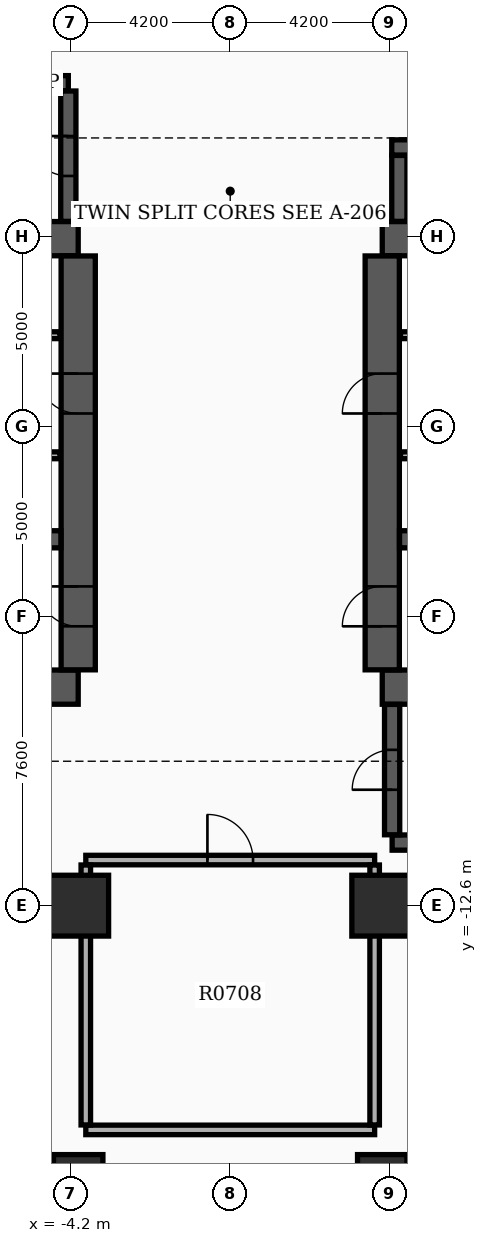
"""IFC4 building model, lengths in metres.
Left out: names, types, materials, properties, quantities, classifications, styles, units other than length and angle.
Written with IfcOpenShell. Run it as: python <this file> out.ifc"""

import sys

from ifc_helpers import new_model, si_unit, direction, frame, frame_2d, origin, origin_2d, place, context, subcontext, project, spatial, rectangle, extrude, element, fill, save


model = new_model("IFC4")
c1 = context("Model", 3, precision=1e-05, world=origin(), true_north=direction((0.0, 1.0)))
c2 = subcontext(c1, "Body", "Model", "MODEL_VIEW")
j1 = project(units=[si_unit("LENGTHUNIT", "METRE"), si_unit("PLANEANGLEUNIT", "RADIAN")], contexts=[c1])
p1 = place(None, origin())
s1 = spatial("IfcSite", under=j1, at=p1, CompositionType="ELEMENT")
p2 = place(p1, origin())
s2 = spatial("IfcBuilding", under=s1, at=p2, CompositionType="ELEMENT")
p3 = place(p2, frame((0.0, 0.0, 47.1)))
s3 = spatial("IfcBuildingStorey", under=s2, at=p3, CompositionType="ELEMENT", Elevation=47.1)
for number, where, z_axis, x_axis in (
    (1, (-12.4, -6.85, 0.0), (0.0, 0.0, 1.0), (1.0, 0.0, 0.0)),
    (2, (-12.4, 4.95, 0.0), (0.0, 0.0, 1.0), (1.0, 0.0, 0.0)),
):
    element("IfcWall", number, at=place(p3, frame(where, z_axis=z_axis, x_axis=x_axis)), inside=s3, PredefinedType="SHEAR", context=c2, shape_type="SweptSolid", body=[
        extrude(rectangle(XDim=8.4, YDim=0.9, at=frame_2d((4.2, 0.0))), origin(), (0.0, 0.0, 1.0), 4.9),
    ])
p4 = place(p3, frame((-4.0, -6.395, 0.0), z_axis=(0.0, 0.0, 1.0), x_axis=(0.0, 1.0, 0.0)))
e3 = element("IfcWall", 3, at=p4, inside=s3, PredefinedType="SHEAR", context=c2, shape_type="SweptSolid", body=[
    extrude(rectangle(XDim=10.89, YDim=0.9, at=frame_2d((5.445, 0.0))), origin(), (0.0, 0.0, 1.0), 4.9),
])
p5 = place(p4, frame((1.145, 0.0, 0.0)))
e4 = element("IfcOpeningElement", 4, at=p5, cuts=e3, PredefinedType="OPENING", context=c2, shape_type="SweptSolid", body=[
    extrude(rectangle(XDim=1.05, YDim=2.15, at=frame_2d((0.525, 1.075))), frame((0.0, 0.46, 0.0), z_axis=(0.0, -1.0, 0.0), x_axis=(1.0, 0.0, 0.0)), (0.0, 0.0, 1.0), 0.92),
])
p6 = place(p4, frame((6.745, 0.0, 0.0)))
e5 = element("IfcOpeningElement", 5, at=p6, cuts=e3, PredefinedType="OPENING", context=c2, shape_type="SweptSolid", body=[
    extrude(rectangle(XDim=1.05, YDim=2.15, at=frame_2d((0.525, 1.075))), frame((0.0, 0.46, 0.0), z_axis=(0.0, -1.0, 0.0), x_axis=(1.0, 0.0, 0.0)), (0.0, 0.0, 1.0), 0.92),
])
p7 = place(p3, frame((-11.945, -2.96, 0.0), z_axis=(0.0, 0.0, 1.0), x_axis=(1.0, 0.0, 0.0)))
e6 = element("IfcWall", 6, at=p7, inside=s3, PredefinedType="SHEAR", context=c2, shape_type="SweptSolid", body=[
    extrude(rectangle(XDim=7.49, YDim=0.45, at=frame_2d((3.745, 0.0))), origin(), (0.0, 0.0, 1.0), 4.9),
])
for number, where, z_axis, x_axis in (
    (7, (4.0, -6.85, 0.0), (0.0, 0.0, 1.0), (1.0, 0.0, 0.0)),
    (8, (4.0, 4.95, 0.0), (0.0, 0.0, 1.0), (1.0, 0.0, 0.0)),
):
    element("IfcWall", number, at=place(p3, frame(where, z_axis=z_axis, x_axis=x_axis)), inside=s3, PredefinedType="SHEAR", context=c2, shape_type="SweptSolid", body=[
        extrude(rectangle(XDim=8.4, YDim=0.9, at=frame_2d((4.2, 0.0))), origin(), (0.0, 0.0, 1.0), 4.9),
    ])
p8 = place(p3, frame((4.0, -6.395, 0.0), z_axis=(0.0, 0.0, 1.0), x_axis=(0.0, 1.0, 0.0)))
e9 = element("IfcWall", 9, at=p8, inside=s3, PredefinedType="SHEAR", context=c2, shape_type="SweptSolid", body=[
    extrude(rectangle(XDim=10.89, YDim=0.9, at=frame_2d((5.445, 0.0))), origin(), (0.0, 0.0, 1.0), 4.9),
])
p9 = place(p8, frame((1.145, 0.0, 0.0)))
e10 = element("IfcOpeningElement", 10, at=p9, cuts=e9, PredefinedType="OPENING", context=c2, shape_type="SweptSolid", body=[
    extrude(rectangle(XDim=1.05, YDim=2.15, at=frame_2d((0.525, 1.075))), frame((0.0, 0.46, 0.0), z_axis=(0.0, -1.0, 0.0), x_axis=(1.0, 0.0, 0.0)), (0.0, 0.0, 1.0), 0.92),
])
p10 = place(p8, frame((6.745, 0.0, 0.0)))
e11 = element("IfcOpeningElement", 11, at=p10, cuts=e9, PredefinedType="OPENING", context=c2, shape_type="SweptSolid", body=[
    extrude(rectangle(XDim=1.05, YDim=2.15, at=frame_2d((0.525, 1.075))), frame((0.0, 0.46, 0.0), z_axis=(0.0, -1.0, 0.0), x_axis=(1.0, 0.0, 0.0)), (0.0, 0.0, 1.0), 0.92),
])
p11 = place(p3, frame((4.455, -2.96, 0.0), z_axis=(0.0, 0.0, 1.0), x_axis=(1.0, 0.0, 0.0)))
e12 = element("IfcWall", 12, at=p11, inside=s3, PredefinedType="SHEAR", context=c2, shape_type="SweptSolid", body=[
    extrude(rectangle(XDim=7.49, YDim=0.45, at=frame_2d((3.745, 0.0))), origin(), (0.0, 0.0, 1.0), 4.9),
])
p12 = place(p3, frame((-12.22, 9.04, 0.0), z_axis=(0.0, 0.0, 1.0), x_axis=(1.0, 0.0, 0.0)))
e13 = element("IfcWall", 13, at=p12, inside=s3, PredefinedType="SHEAR", context=c2, shape_type="SweptSolid", body=[
    extrude(rectangle(XDim=7.96, YDim=0.4, at=frame_2d((3.98, 0.0))), origin(), (0.0, 0.0, 1.0), 4.9),
])
p13 = place(p3, frame((-4.26, 5.405, 0.0), z_axis=(0.0, 0.0, 1.0), x_axis=(0.0, 1.0, 0.0)))
e14 = element("IfcWall", 14, at=p13, inside=s3, PredefinedType="SHEAR", context=c2, shape_type="SweptSolid", body=[
    extrude(rectangle(XDim=3.43, YDim=0.4, at=frame_2d((1.715, 0.0))), origin(), (0.0, 0.0, 1.0), 4.9),
])
p14 = place(p13, frame((1.195, 0.0, 0.0)))
e15 = element("IfcOpeningElement", 15, at=p14, cuts=e14, PredefinedType="OPENING", context=c2, shape_type="SweptSolid", body=[
    extrude(rectangle(XDim=1.05, YDim=2.15, at=frame_2d((0.525, 1.075))), frame((0.0, 0.21, 0.0), z_axis=(0.0, -1.0, 0.0), x_axis=(1.0, 0.0, 0.0)), (0.0, 0.0, 1.0), 0.42),
])
p15 = place(p3, frame((4.26, -10.94, 0.0), z_axis=(0.0, 0.0, 1.0), x_axis=(1.0, 0.0, 0.0)))
e16 = element("IfcWall", 16, at=p15, inside=s3, PredefinedType="SHEAR", context=c2, shape_type="SweptSolid", body=[
    extrude(rectangle(XDim=7.96, YDim=0.4, at=frame_2d((3.98, 0.0))), origin(), (0.0, 0.0, 1.0), 4.9),
])
p16 = place(p3, frame((4.26, -10.735, 0.0), z_axis=(0.0, 0.0, 1.0), x_axis=(0.0, 1.0, 0.0)))
e17 = element("IfcWall", 17, at=p16, inside=s3, PredefinedType="SHEAR", context=c2, shape_type="SweptSolid", body=[
    extrude(rectangle(XDim=3.43, YDim=0.4, at=frame_2d((1.715, 0.0))), origin(), (0.0, 0.0, 1.0), 4.9),
])
p17 = place(p16, frame((1.185, 0.0, 0.0)))
e18 = element("IfcOpeningElement", 18, at=p17, cuts=e17, PredefinedType="OPENING", context=c2, shape_type="SweptSolid", body=[
    extrude(rectangle(XDim=1.05, YDim=2.15, at=frame_2d((0.525, 1.075))), frame((0.0, 0.21, 0.0), z_axis=(0.0, -1.0, 0.0), x_axis=(1.0, 0.0, 0.0)), (0.0, 0.0, 1.0), 0.42),
])
p18 = place(p3, frame((4.45, 5.405, 0.0), z_axis=(0.0, 0.0, 1.0), x_axis=(0.0, 1.0, 0.0)))
e19 = element("IfcWall", 19, at=p18, inside=s3, PredefinedType="SHEAR", context=c2, shape_type="SweptSolid", body=[
    extrude(rectangle(XDim=1.735, YDim=0.4, at=frame_2d((0.867, 0.0))), origin(), (0.0, 0.0, 1.0), 4.9),
])
p19 = place(p3, frame((4.25, 7.35, 0.0), z_axis=(0.0, 0.0, 1.0), x_axis=(1.0, 0.0, 0.0)))
e20 = element("IfcWall", 20, at=p19, inside=s3, PredefinedType="SHEAR", context=c2, shape_type="SweptSolid", body=[
    extrude(rectangle(XDim=5.4, YDim=0.4, at=frame_2d((2.7, 0.0))), origin(), (0.0, 0.0, 1.0), 4.9),
])
p20 = place(p19, frame((0.85, 0.0, 0.0)))
e21 = element("IfcOpeningElement", 21, at=p20, cuts=e20, PredefinedType="OPENING", context=c2, shape_type="SweptSolid", body=[
    extrude(rectangle(XDim=1.2, YDim=2.2, at=frame_2d((0.6, 1.1))), frame((0.0, 0.21, 0.0), z_axis=(0.0, -1.0, 0.0), x_axis=(1.0, 0.0, 0.0)), (0.0, 0.0, 1.0), 0.42),
])
p21 = place(p19, frame((3.25, 0.0, 0.0)))
e22 = element("IfcOpeningElement", 22, at=p21, cuts=e20, PredefinedType="OPENING", context=c2, shape_type="SweptSolid", body=[
    extrude(rectangle(XDim=1.2, YDim=2.2, at=frame_2d((0.6, 1.1))), frame((0.0, 0.21, 0.0), z_axis=(0.0, -1.0, 0.0), x_axis=(1.0, 0.0, 0.0)), (0.0, 0.0, 1.0), 0.42),
])
for number, where, z_axis, x_axis in (
    (23, (-4.0, -12.6, 0.0), (0.0, 0.0, 1.0), (1.0, 0.0, 0.0)),
    (24, (4.0, -12.6, 0.0), (0.0, 0.0, 1.0), (1.0, 0.0, 0.0)),
):
    element("IfcColumn", number, at=place(p3, frame(where, z_axis=z_axis, x_axis=x_axis)), inside=s3, PredefinedType="COLUMN", context=c2, shape_type="SweptSolid", body=[
        extrude(rectangle(XDim=1.6, YDim=1.6, at=origin_2d()), origin(), (0.0, 0.0, 1.0), 5.1),
    ])
for number, where, z_axis, x_axis in (
    (25, (-4.0, -19.8, 0.0), (0.0, 0.0, 1.0), (1.0, 0.0, 0.0)),
    (26, (4.0, -19.8, 0.0), (0.0, 0.0, 1.0), (1.0, 0.0, 0.0)),
):
    element("IfcColumn", number, at=place(p3, frame(where, z_axis=z_axis, x_axis=x_axis)), inside=s3, PredefinedType="COLUMN", context=c2, shape_type="SweptSolid", body=[
        extrude(rectangle(XDim=1.3, YDim=1.3, at=origin_2d()), origin(), (0.0, 0.0, 1.0), 5.1),
    ])
p22 = place(p3, frame((-5.769, -15.333, 0.0), z_axis=(0.0, 0.0, 1.0), x_axis=(0.062784355807, -0.998027116198, 0.0)))
e27 = element("IfcWall", 27, at=p22, inside=s3, PredefinedType="STANDARD", context=c2, shape_type="SweptSolid", body=[
    extrude(rectangle(XDim=20.1, YDim=0.28, at=frame_2d((10.05, 0.0))), origin(), (0.0, 0.0, 1.0), 3.98),
])
p23 = place(p22, frame((0.85, 0.0, 0.95)))
e28 = element("IfcOpeningElement", 28, at=p23, cuts=e27, PredefinedType="OPENING", context=c2, shape_type="SweptSolid", body=[
    extrude(rectangle(XDim=1.1, YDim=1.2, at=frame_2d((0.55, 0.6))), frame((0.0, 0.15, 0.0), z_axis=(0.0, -1.0, 0.0), x_axis=(1.0, 0.0, 0.0)), (0.0, 0.0, 1.0), 0.3),
])
p24 = place(p3, frame((-11.9, 2.41, 0.0), z_axis=(0.0, 0.0, 1.0), x_axis=(1.0, 0.0, 0.0)))
e29 = element("IfcWall", 29, at=p24, inside=s3, PredefinedType="SOLIDWALL", context=c2, shape_type="SweptSolid", body=[
    extrude(rectangle(XDim=7.42, YDim=0.18, at=frame_2d((3.71, 0.0))), origin(), (0.0, 0.0, 1.0), 3.97),
])
p25 = place(p24, frame((0.55, 0.0, 0.0)))
e30 = element("IfcOpeningElement", 30, at=p25, cuts=e29, PredefinedType="OPENING", context=c2, shape_type="SweptSolid", body=[
    extrude(rectangle(XDim=1.1, YDim=2.15, at=frame_2d((0.55, 1.075))), frame((0.0, 0.1, 0.0), z_axis=(0.0, -1.0, 0.0), x_axis=(1.0, 0.0, 0.0)), (0.0, 0.0, 1.0), 0.2),
])
p26 = place(p24, frame((3.85, 0.0, 0.0)))
e31 = element("IfcOpeningElement", 31, at=p26, cuts=e29, PredefinedType="OPENING", context=c2, shape_type="SweptSolid", body=[
    extrude(rectangle(XDim=1.1, YDim=2.15, at=frame_2d((0.55, 1.075))), frame((0.0, 0.1, 0.0), z_axis=(0.0, -1.0, 0.0), x_axis=(1.0, 0.0, 0.0)), (0.0, 0.0, 1.0), 0.2),
])
p27 = place(p24, frame((5.75, 0.0, 0.0)))
e32 = element("IfcOpeningElement", 32, at=p27, cuts=e29, PredefinedType="OPENING", context=c2, shape_type="SweptSolid", body=[
    extrude(rectangle(XDim=1.1, YDim=2.15, at=frame_2d((0.55, 1.075))), frame((0.0, 0.1, 0.0), z_axis=(0.0, -1.0, 0.0), x_axis=(1.0, 0.0, 0.0)), (0.0, 0.0, 1.0), 0.2),
])
p28 = place(p3, frame((4.48, 2.41, 0.0), z_axis=(0.0, 0.0, 1.0), x_axis=(1.0, 0.0, 0.0)))
e33 = element("IfcWall", 33, at=p28, inside=s3, PredefinedType="SOLIDWALL", context=c2, shape_type="SweptSolid", body=[
    extrude(rectangle(XDim=7.42, YDim=0.18, at=frame_2d((3.71, 0.0))), origin(), (0.0, 0.0, 1.0), 3.97),
])
p29 = place(p28, frame((5.67, 0.0, 0.0)))
e34 = element("IfcOpeningElement", 34, at=p29, cuts=e33, PredefinedType="OPENING", context=c2, shape_type="SweptSolid", body=[
    extrude(rectangle(XDim=1.1, YDim=2.15, at=frame_2d((0.55, 1.075))), frame((0.0, 0.1, 0.0), z_axis=(0.0, -1.0, 0.0), x_axis=(1.0, 0.0, 0.0)), (0.0, 0.0, 1.0), 0.2),
])
p30 = place(p28, frame((0.52, 0.0, 0.0)))
e35 = element("IfcOpeningElement", 35, at=p30, cuts=e33, PredefinedType="OPENING", context=c2, shape_type="SweptSolid", body=[
    extrude(rectangle(XDim=1.1, YDim=2.15, at=frame_2d((0.55, 1.075))), frame((0.0, 0.1, 0.0), z_axis=(0.0, -1.0, 0.0), x_axis=(1.0, 0.0, 0.0)), (0.0, 0.0, 1.0), 0.2),
])
p31 = place(p28, frame((2.42, 0.0, 0.0)))
e36 = element("IfcOpeningElement", 36, at=p31, cuts=e33, PredefinedType="OPENING", context=c2, shape_type="SweptSolid", body=[
    extrude(rectangle(XDim=1.1, YDim=2.15, at=frame_2d((0.55, 1.075))), frame((0.0, 0.1, 0.0), z_axis=(0.0, -1.0, 0.0), x_axis=(1.0, 0.0, 0.0)), (0.0, 0.0, 1.0), 0.2),
])
p32 = place(p3, frame((-11.9, -0.75, 0.0), z_axis=(0.0, 0.0, 1.0), x_axis=(1.0, 0.0, 0.0)))
e37 = element("IfcWall", 37, at=p32, inside=s3, PredefinedType="SOLIDWALL", context=c2, shape_type="SweptSolid", body=[
    extrude(rectangle(XDim=7.42, YDim=0.18, at=frame_2d((3.71, 0.0))), origin(), (0.0, 0.0, 1.0), 3.97),
])
p33 = place(p32, frame((0.45, 0.0, 0.0)))
e38 = element("IfcOpeningElement", 38, at=p33, cuts=e37, PredefinedType="OPENING", context=c2, shape_type="SweptSolid", body=[
    extrude(rectangle(XDim=1.1, YDim=2.15, at=frame_2d((0.55, 1.075))), frame((0.0, 0.1, 0.0), z_axis=(0.0, -1.0, 0.0), x_axis=(1.0, 0.0, 0.0)), (0.0, 0.0, 1.0), 0.2),
])
p34 = place(p32, frame((2.35, 0.0, 0.0)))
e39 = element("IfcOpeningElement", 39, at=p34, cuts=e37, PredefinedType="OPENING", context=c2, shape_type="SweptSolid", body=[
    extrude(rectangle(XDim=1.1, YDim=2.15, at=frame_2d((0.55, 1.075))), frame((0.0, 0.1, 0.0), z_axis=(0.0, -1.0, 0.0), x_axis=(1.0, 0.0, 0.0)), (0.0, 0.0, 1.0), 0.2),
])
p35 = place(p32, frame((5.75, 0.0, 0.0)))
e40 = element("IfcOpeningElement", 40, at=p35, cuts=e37, PredefinedType="OPENING", context=c2, shape_type="SweptSolid", body=[
    extrude(rectangle(XDim=1.1, YDim=2.15, at=frame_2d((0.55, 1.075))), frame((0.0, 0.1, 0.0), z_axis=(0.0, -1.0, 0.0), x_axis=(1.0, 0.0, 0.0)), (0.0, 0.0, 1.0), 0.2),
])
p36 = place(p3, frame((4.48, -0.75, 0.0), z_axis=(0.0, 0.0, 1.0), x_axis=(1.0, 0.0, 0.0)))
e41 = element("IfcWall", 41, at=p36, inside=s3, PredefinedType="SOLIDWALL", context=c2, shape_type="SweptSolid", body=[
    extrude(rectangle(XDim=7.42, YDim=0.18, at=frame_2d((3.71, 0.0))), origin(), (0.0, 0.0, 1.0), 3.97),
])
p37 = place(p36, frame((0.52, 0.0, 0.0)))
e42 = element("IfcOpeningElement", 42, at=p37, cuts=e41, PredefinedType="OPENING", context=c2, shape_type="SweptSolid", body=[
    extrude(rectangle(XDim=1.1, YDim=2.15, at=frame_2d((0.55, 1.075))), frame((0.0, 0.1, 0.0), z_axis=(0.0, -1.0, 0.0), x_axis=(1.0, 0.0, 0.0)), (0.0, 0.0, 1.0), 0.2),
])
p38 = place(p36, frame((3.92, 0.0, 0.0)))
e43 = element("IfcOpeningElement", 43, at=p38, cuts=e41, PredefinedType="OPENING", context=c2, shape_type="SweptSolid", body=[
    extrude(rectangle(XDim=1.1, YDim=2.15, at=frame_2d((0.55, 1.075))), frame((0.0, 0.1, 0.0), z_axis=(0.0, -1.0, 0.0), x_axis=(1.0, 0.0, 0.0)), (0.0, 0.0, 1.0), 0.2),
])
p39 = place(p36, frame((5.82, 0.0, 0.0)))
e44 = element("IfcOpeningElement", 44, at=p39, cuts=e41, PredefinedType="OPENING", context=c2, shape_type="SweptSolid", body=[
    extrude(rectangle(XDim=1.1, YDim=2.15, at=frame_2d((0.55, 1.075))), frame((0.0, 0.1, 0.0), z_axis=(0.0, -1.0, 0.0), x_axis=(1.0, 0.0, 0.0)), (0.0, 0.0, 1.0), 0.2),
])
p40 = place(p3, frame((-3.8, -18.5, 0.0), z_axis=(0.0, 0.0, 1.0), x_axis=(1.0, 0.0, 0.0)))
e45 = element("IfcWall", 45, at=p40, inside=s3, PredefinedType="SOLIDWALL", context=c2, shape_type="SweptSolid", body=[
    extrude(rectangle(XDim=7.6, YDim=0.25, at=frame_2d((3.8, 0.0))), origin(), (0.0, 0.0, 1.0), 3.97),
])
p41 = place(p3, frame((-3.8, -11.4, 0.0), z_axis=(0.0, 0.0, 1.0), x_axis=(1.0, 0.0, 0.0)))
e46 = element("IfcWall", 46, at=p41, inside=s3, PredefinedType="SOLIDWALL", context=c2, shape_type="SweptSolid", body=[
    extrude(rectangle(XDim=7.6, YDim=0.25, at=frame_2d((3.8, 0.0))), origin(), (0.0, 0.0, 1.0), 3.97),
])
p42 = place(p41, frame((3.2, 0.0, 0.0)))
e47 = element("IfcOpeningElement", 47, at=p42, cuts=e46, PredefinedType="OPENING", context=c2, shape_type="SweptSolid", body=[
    extrude(rectangle(XDim=1.2, YDim=2.15, at=frame_2d((0.6, 1.075))), frame((0.0, 0.135, 0.0), z_axis=(0.0, -1.0, 0.0), x_axis=(1.0, 0.0, 0.0)), (0.0, 0.0, 1.0), 0.27),
])
for number, where, z_axis, x_axis in (
    (48, (-3.8, -18.37, 0.0), (0.0, 0.0, 1.0), (0.0, 1.0, 0.0)),
    (49, (3.8, -18.37, 0.0), (0.0, 0.0, 1.0), (0.0, 1.0, 0.0)),
):
    element("IfcWall", number, at=place(p3, frame(where, z_axis=z_axis, x_axis=x_axis)), inside=s3, PredefinedType="SOLIDWALL", context=c2, shape_type="SweptSolid", body=[
        extrude(rectangle(XDim=6.84, YDim=0.25, at=frame_2d((3.42, 0.0))), origin(), (0.0, 0.0, 1.0), 3.97),
    ])
p43 = place(p5, origin())
e50 = element("IfcDoor", 50, at=p43, inside=s3, OperationType="SINGLE_SWING_RIGHT", PredefinedType="DOOR", context=c2, shape_type="SweptSolid", body=[
    extrude(rectangle(XDim=1.05, YDim=2.15, at=frame_2d((0.525, 1.075))), frame((0.0, 0.025, 0.0), z_axis=(0.0, -1.0, 0.0), x_axis=(1.0, 0.0, 0.0)), (0.0, 0.0, 1.0), 0.05),
])
fill(e4, e50)
p44 = place(p9, origin())
e51 = element("IfcDoor", 51, at=p44, inside=s3, OperationType="SINGLE_SWING_LEFT", PredefinedType="DOOR", context=c2, shape_type="SweptSolid", body=[
    extrude(rectangle(XDim=1.05, YDim=2.15, at=frame_2d((0.525, 1.075))), frame((0.0, 0.025, 0.0), z_axis=(0.0, -1.0, 0.0), x_axis=(1.0, 0.0, 0.0)), (0.0, 0.0, 1.0), 0.05),
])
fill(e10, e51)
p45 = place(p6, origin())
e52 = element("IfcDoor", 52, at=p45, inside=s3, OperationType="SINGLE_SWING_RIGHT", PredefinedType="DOOR", context=c2, shape_type="SweptSolid", body=[
    extrude(rectangle(XDim=1.05, YDim=2.15, at=frame_2d((0.525, 1.075))), frame((0.0, 0.025, 0.0), z_axis=(0.0, -1.0, 0.0), x_axis=(1.0, 0.0, 0.0)), (0.0, 0.0, 1.0), 0.05),
])
fill(e5, e52)
p46 = place(p10, origin())
e53 = element("IfcDoor", 53, at=p46, inside=s3, OperationType="SINGLE_SWING_LEFT", PredefinedType="DOOR", context=c2, shape_type="SweptSolid", body=[
    extrude(rectangle(XDim=1.05, YDim=2.15, at=frame_2d((0.525, 1.075))), frame((0.0, 0.025, 0.0), z_axis=(0.0, -1.0, 0.0), x_axis=(1.0, 0.0, 0.0)), (0.0, 0.0, 1.0), 0.05),
])
fill(e11, e53)
p47 = place(p14, origin())
e54 = element("IfcDoor", 54, at=p47, inside=s3, OperationType="SINGLE_SWING_RIGHT", PredefinedType="DOOR", context=c2, shape_type="SweptSolid", body=[
    extrude(rectangle(XDim=1.05, YDim=2.15, at=frame_2d((0.525, 1.075))), frame((0.0, 0.025, 0.0), z_axis=(0.0, -1.0, 0.0), x_axis=(1.0, 0.0, 0.0)), (0.0, 0.0, 1.0), 0.05),
])
fill(e15, e54)
p48 = place(p17, origin())
e55 = element("IfcDoor", 55, at=p48, inside=s3, OperationType="SINGLE_SWING_LEFT", PredefinedType="DOOR", context=c2, shape_type="SweptSolid", body=[
    extrude(rectangle(XDim=1.05, YDim=2.15, at=frame_2d((0.525, 1.075))), frame((0.0, 0.025, 0.0), z_axis=(0.0, -1.0, 0.0), x_axis=(1.0, 0.0, 0.0)), (0.0, 0.0, 1.0), 0.05),
])
fill(e18, e55)
p49 = place(p42, origin())
e56 = element("IfcDoor", 56, at=p49, inside=s3, OperationType="SINGLE_SWING_LEFT", PredefinedType="DOOR", context=c2, shape_type="SweptSolid", body=[
    extrude(rectangle(XDim=1.2, YDim=2.15, at=frame_2d((0.6, 1.075))), frame((0.0, 0.025, 0.0), z_axis=(0.0, -1.0, 0.0), x_axis=(1.0, 0.0, 0.0)), (0.0, 0.0, 1.0), 0.05),
])
fill(e47, e56)
save(model, sys.argv[1])
